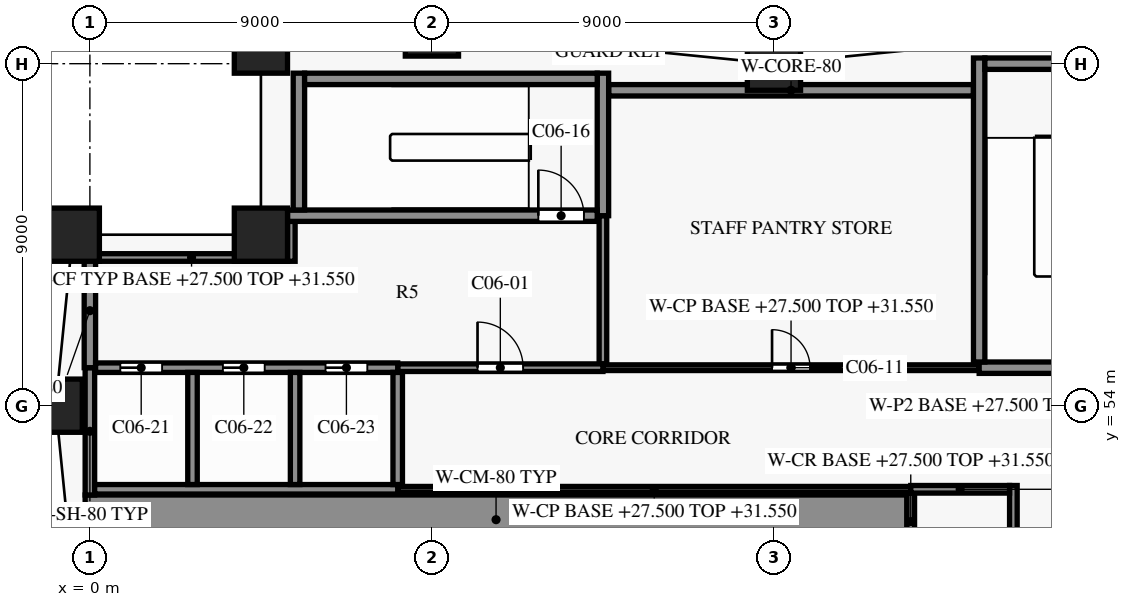
"""IFC4 building model, lengths in metres.
Left out: names, types, materials, properties, quantities, classifications, styles, units other than length and angle.
Written with IfcOpenShell. Run it as: python <this file> out.ifc"""

import sys

from ifc_helpers import new_model, si_unit, direction, frame, frame_2d, origin, origin_2d, place, context, subcontext, project, spatial, rectangle, extrude, element, fill, save


model = new_model("IFC4")
c1 = context("Model", 3, precision=1e-05, world=origin(), true_north=direction((0.0, 1.0)))
c2 = subcontext(c1, "Body", "Model", "MODEL_VIEW")
j1 = project(units=[si_unit("LENGTHUNIT", "METRE"), si_unit("PLANEANGLEUNIT", "RADIAN")], contexts=[c1])
p1 = place(None, origin())
s1 = spatial("IfcSite", under=j1, at=p1, CompositionType="ELEMENT")
p2 = place(p1, origin())
s2 = spatial("IfcBuilding", under=s1, at=p2, CompositionType="ELEMENT")
p3 = place(p2, frame((0.0, 0.0, 27.5)))
s3 = spatial("IfcBuildingStorey", under=s2, at=p3, CompositionType="ELEMENT", Elevation=27.5)
for number, where, z_axis, x_axis in (
    (1, (18.0, 63.0, 0.0), (0.0, 0.0, 1.0), (1.0, 0.0, 0.0)),
    (2, (9.0, 63.9, 0.0), (0.0, 0.0, 1.0), (1.0, 0.0, 0.0)),
    (3, (4.5, 63.45, 0.0), (0.0, 0.0, 1.0), (1.0, 0.0, 0.0)),
    (4, (-0.45, 58.5, 0.0), (0.0, 0.0, 1.0), (1.0, 0.0, 0.0)),
    (5, (-0.9, 54.0, 0.0), (0.0, 0.0, 1.0), (1.0, 0.0, 0.0)),
    (6, (4.5, 58.5, 0.0), (0.0, 0.0, 1.0), (1.0, 0.0, 0.0)),
):
    element("IfcColumn", number, at=place(p3, frame(where, z_axis=z_axis, x_axis=x_axis)), inside=s3, PredefinedType="COLUMN", context=c2, shape_type="SweptSolid", body=[
        extrude(rectangle(XDim=1.4, YDim=1.4, at=origin_2d()), origin(), (0.0, 0.0, 1.0), 4.5),
    ])
p4 = place(p3, frame((-0.125, 51.0, 0.0), z_axis=(0.0, 0.0, 1.0), x_axis=(1.0, 0.0, 0.0)))
e7 = element("IfcWall", 7, at=p4, inside=s3, PredefinedType="SHEAR", context=c2, shape_type="SweptSolid", body=[
    extrude(rectangle(XDim=21.625, YDim=1.3, at=frame_2d((10.812, 0.0))), origin(), (0.0, 0.0, 1.0), 4.2),
])
p5 = place(p3, frame((8.1, 51.8, 0.0), z_axis=(0.0, 0.0, 1.0), x_axis=(1.0, 0.0, 0.0)))
e8 = element("IfcWall", 8, at=p5, inside=s3, PredefinedType="PARTITIONING", context=c2, shape_type="SweptSolid", body=[
    extrude(rectangle(XDim=13.5, YDim=0.15, at=frame_2d((6.75, 0.0))), origin(), (0.0, 0.0, 1.0), 4.05),
])
p6 = place(p3, frame((21.6, 51.8, 0.0), z_axis=(0.0, 0.0, 1.0), x_axis=(1.0, 0.0, 0.0)))
e9 = element("IfcWall", 9, at=p6, inside=s3, PredefinedType="PARTITIONING", context=c2, shape_type="SweptSolid", body=[
    extrude(rectangle(XDim=2.6, YDim=0.2, at=frame_2d((1.3, 0.0))), origin(), (0.0, 0.0, 1.0), 4.05),
])
p7 = place(p3, frame((0.125, 51.8, 0.0), z_axis=(0.0, 0.0, 1.0), x_axis=(1.0, 0.0, 0.0)))
e10 = element("IfcWall", 10, at=p7, inside=s3, PredefinedType="SHEAR", context=c2, shape_type="SweptSolid", body=[
    extrude(rectangle(XDim=7.975, YDim=0.25, at=frame_2d((3.988, 0.0))), origin(), (0.0, 0.0, 1.0), 4.2),
])
p8 = place(p3, frame((8.1, 55.0, 0.0), z_axis=(0.0, 0.0, 1.0), x_axis=(1.0, 0.0, 0.0)))
e11 = element("IfcWall", 11, at=p8, inside=s3, PredefinedType="PARTITIONING", context=c2, shape_type="SweptSolid", body=[
    extrude(rectangle(XDim=5.4, YDim=0.2, at=frame_2d((2.7, 0.0))), origin(), (0.0, 0.0, 1.0), 4.05),
])
p9 = place(p8, frame((2.1, 0.0, 0.0)))
e12 = element("IfcOpeningElement", 12, at=p9, cuts=e11, PredefinedType="OPENING", context=c2, shape_type="SweptSolid", body=[
    extrude(rectangle(XDim=1.2, YDim=2.2, at=frame_2d((0.6, 1.1))), frame((0.0, 0.11, 0.0), z_axis=(0.0, -1.0, 0.0), x_axis=(1.0, 0.0, 0.0)), (0.0, 0.0, 1.0), 0.22),
])
p10 = place(p3, frame((13.5, 55.0, 0.0), z_axis=(0.0, 0.0, 1.0), x_axis=(1.0, 0.0, 0.0)))
e13 = element("IfcWall", 13, at=p10, inside=s3, PredefinedType="PARTITIONING", context=c2, shape_type="SweptSolid", body=[
    extrude(rectangle(XDim=9.9, YDim=0.15, at=frame_2d((4.95, 0.0))), origin(), (0.0, 0.0, 1.0), 4.05),
])
p11 = place(p10, frame((4.45, 0.0, 0.0)))
e14 = element("IfcOpeningElement", 14, at=p11, cuts=e13, PredefinedType="OPENING", context=c2, shape_type="SweptSolid", body=[
    extrude(rectangle(XDim=1.0, YDim=2.1, at=frame_2d((0.5, 1.05))), frame((0.0, 0.085, 0.0), z_axis=(0.0, -1.0, 0.0), x_axis=(1.0, 0.0, 0.0)), (0.0, 0.0, 1.0), 0.17),
])
p12 = place(p3, frame((0.15, 55.0, 0.0), z_axis=(0.0, 0.0, 1.0), x_axis=(1.0, 0.0, 0.0)))
e15 = element("IfcWall", 15, at=p12, inside=s3, PredefinedType="SHEAR", context=c2, shape_type="SweptSolid", body=[
    extrude(rectangle(XDim=7.95, YDim=0.25, at=frame_2d((3.975, 0.0))), origin(), (0.0, 0.0, 1.0), 4.2),
])
p13 = place(p12, frame((0.65, 0.0, 0.0)))
e16 = element("IfcOpeningElement", 16, at=p13, cuts=e15, PredefinedType="OPENING", context=c2, shape_type="SweptSolid", body=[
    extrude(rectangle(XDim=1.1, YDim=2.1, at=frame_2d((0.55, 1.05))), frame((0.0, 0.135, 0.0), z_axis=(0.0, -1.0, 0.0), x_axis=(1.0, 0.0, 0.0)), (0.0, 0.0, 1.0), 0.27),
])
p14 = place(p12, frame((3.35, 0.0, 0.0)))
e17 = element("IfcOpeningElement", 17, at=p14, cuts=e15, PredefinedType="OPENING", context=c2, shape_type="SweptSolid", body=[
    extrude(rectangle(XDim=1.1, YDim=2.1, at=frame_2d((0.55, 1.05))), frame((0.0, 0.135, 0.0), z_axis=(0.0, -1.0, 0.0), x_axis=(1.0, 0.0, 0.0)), (0.0, 0.0, 1.0), 0.27),
])
p15 = place(p12, frame((6.05, 0.0, 0.0)))
e18 = element("IfcOpeningElement", 18, at=p15, cuts=e15, PredefinedType="OPENING", context=c2, shape_type="SweptSolid", body=[
    extrude(rectangle(XDim=1.1, YDim=2.1, at=frame_2d((0.55, 1.05))), frame((0.0, 0.135, 0.0), z_axis=(0.0, -1.0, 0.0), x_axis=(1.0, 0.0, 0.0)), (0.0, 0.0, 1.0), 0.27),
])
p16 = place(p3, frame((23.4, 55.0, 0.0), z_axis=(0.0, 0.0, 1.0), x_axis=(1.0, 0.0, 0.0)))
e19 = element("IfcWall", 19, at=p16, inside=s3, PredefinedType="SHEAR", context=c2, shape_type="SweptSolid", body=[
    extrude(rectangle(XDim=3.45, YDim=0.3, at=frame_2d((1.725, 0.0))), origin(), (0.0, 0.0, 1.0), 4.2),
])
p17 = place(p3, frame((0.15, 57.9, 0.0), z_axis=(0.0, 0.0, 1.0), x_axis=(1.0, 0.0, 0.0)))
e20 = element("IfcWall", 20, at=p17, inside=s3, PredefinedType="PARTITIONING", context=c2, shape_type="SweptSolid", body=[
    extrude(rectangle(XDim=5.05, YDim=0.2, at=frame_2d((2.525, 0.0))), origin(), (0.0, 0.0, 1.0), 4.05),
])
p18 = place(p3, frame((5.2, 59.0, 0.0), z_axis=(0.0, 0.0, 1.0), x_axis=(1.0, 0.0, 0.0)))
e21 = element("IfcWall", 21, at=p18, inside=s3, PredefinedType="SHEAR", context=c2, shape_type="SweptSolid", body=[
    extrude(rectangle(XDim=8.15, YDim=0.3, at=frame_2d((4.075, 0.0))), origin(), (0.0, 0.0, 1.0), 4.2),
])
p19 = place(p18, frame((6.6, 0.0, 0.0)))
e22 = element("IfcOpeningElement", 22, at=p19, cuts=e21, PredefinedType="OPENING", context=c2, shape_type="SweptSolid", body=[
    extrude(rectangle(XDim=1.2, YDim=2.2, at=frame_2d((0.6, 1.1))), frame((0.0, 0.16, 0.0), z_axis=(0.0, -1.0, 0.0), x_axis=(1.0, 0.0, 0.0)), (0.0, 0.0, 1.0), 0.32),
])
p20 = place(p3, frame((13.65, 62.3, 0.0), z_axis=(0.0, 0.0, 1.0), x_axis=(1.0, 0.0, 0.0)))
e23 = element("IfcWall", 23, at=p20, inside=s3, PredefinedType="SHEAR", context=c2, shape_type="SweptSolid", body=[
    extrude(rectangle(XDim=9.6, YDim=0.3, at=frame_2d((4.8, 0.0))), origin(), (0.0, 0.0, 1.0), 4.2),
])
p21 = place(p3, frame((5.65, 62.6, 0.0), z_axis=(0.0, 0.0, 1.0), x_axis=(1.0, 0.0, 0.0)))
e24 = element("IfcWall", 24, at=p21, inside=s3, PredefinedType="SHEAR", context=c2, shape_type="SweptSolid", body=[
    extrude(rectangle(XDim=7.7, YDim=0.3, at=frame_2d((3.85, 0.0))), origin(), (0.0, 0.0, 1.0), 4.2),
])
p22 = place(p3, frame((23.55, 63.0, 0.0), z_axis=(0.0, 0.0, 1.0), x_axis=(1.0, 0.0, 0.0)))
e25 = element("IfcWall", 25, at=p22, inside=s3, PredefinedType="SHEAR", context=c2, shape_type="SweptSolid", body=[
    extrude(rectangle(XDim=3.3, YDim=0.3, at=frame_2d((1.65, 0.0))), origin(), (0.0, 0.0, 1.0), 4.2),
])
p23 = place(p3, frame((0.0, 55.0, 0.0), z_axis=(0.0, 0.0, 1.0), x_axis=(0.0, 1.0, 0.0)))
e26 = element("IfcWall", 26, at=p23, inside=s3, PredefinedType="SHEAR", context=c2, shape_type="SweptSolid", body=[
    extrude(rectangle(XDim=3.0, YDim=0.3, at=frame_2d((1.5, 0.0))), origin(), (0.0, 0.0, 1.0), 4.2),
])
p24 = place(p3, frame((0.0, 51.65, 0.0), z_axis=(0.0, 0.0, 1.0), x_axis=(0.0, 1.0, 0.0)))
e27 = element("IfcWall", 27, at=p24, inside=s3, PredefinedType="SHEAR", context=c2, shape_type="SweptSolid", body=[
    extrude(rectangle(XDim=3.35, YDim=0.25, at=frame_2d((1.675, 0.0))), origin(), (0.0, 0.0, 1.0), 4.2),
])
p25 = place(p3, frame((2.7, 51.925, 0.0), z_axis=(0.0, 0.0, 1.0), x_axis=(0.0, 1.0, 0.0)))
e28 = element("IfcWall", 28, at=p25, inside=s3, PredefinedType="SHEAR", context=c2, shape_type="SweptSolid", body=[
    extrude(rectangle(XDim=2.95, YDim=0.25, at=frame_2d((1.475, 0.0))), origin(), (0.0, 0.0, 1.0), 4.2),
])
p26 = place(p3, frame((5.3, 57.8, 0.0), z_axis=(0.0, 0.0, 1.0), x_axis=(0.0, 1.0, 0.0)))
e29 = element("IfcWall", 29, at=p26, inside=s3, PredefinedType="PARTITIONING", context=c2, shape_type="SweptSolid", body=[
    extrude(rectangle(XDim=1.05, YDim=0.2, at=frame_2d((0.525, 0.0))), origin(), (0.0, 0.0, 1.0), 4.05),
])
p27 = place(p3, frame((5.4, 51.925, 0.0), z_axis=(0.0, 0.0, 1.0), x_axis=(0.0, 1.0, 0.0)))
e30 = element("IfcWall", 30, at=p27, inside=s3, PredefinedType="SHEAR", context=c2, shape_type="SweptSolid", body=[
    extrude(rectangle(XDim=2.95, YDim=0.25, at=frame_2d((1.475, 0.0))), origin(), (0.0, 0.0, 1.0), 4.2),
])
p28 = place(p3, frame((5.5, 59.15, 0.0), z_axis=(0.0, 0.0, 1.0), x_axis=(0.0, 1.0, 0.0)))
e31 = element("IfcWall", 31, at=p28, inside=s3, PredefinedType="SHEAR", context=c2, shape_type="SweptSolid", body=[
    extrude(rectangle(XDim=3.6, YDim=0.3, at=frame_2d((1.8, 0.0))), origin(), (0.0, 0.0, 1.0), 4.2),
])
p29 = place(p3, frame((8.1, 51.925, 0.0), z_axis=(0.0, 0.0, 1.0), x_axis=(0.0, 1.0, 0.0)))
e32 = element("IfcWall", 32, at=p29, inside=s3, PredefinedType="SHEAR", context=c2, shape_type="SweptSolid", body=[
    extrude(rectangle(XDim=2.95, YDim=0.25, at=frame_2d((1.475, 0.0))), origin(), (0.0, 0.0, 1.0), 4.2),
])
p30 = place(p3, frame((13.5, 55.1, 0.0), z_axis=(0.0, 0.0, 1.0), x_axis=(0.0, 1.0, 0.0)))
e33 = element("IfcWall", 33, at=p30, inside=s3, PredefinedType="PARTITIONING", context=c2, shape_type="SweptSolid", body=[
    extrude(rectangle(XDim=3.9, YDim=0.2, at=frame_2d((1.95, 0.0))), origin(), (0.0, 0.0, 1.0), 4.05),
])
p31 = place(p3, frame((13.5, 59.0, 0.0), z_axis=(0.0, 0.0, 1.0), x_axis=(0.0, 1.0, 0.0)))
e34 = element("IfcWall", 34, at=p31, inside=s3, PredefinedType="SHEAR", context=c2, shape_type="SweptSolid", body=[
    extrude(rectangle(XDim=3.75, YDim=0.3, at=frame_2d((1.875, 0.0))), origin(), (0.0, 0.0, 1.0), 4.2),
])
p32 = place(p3, frame((21.6, 50.2, 0.0), z_axis=(0.0, 0.0, 1.0), x_axis=(0.0, 1.0, 0.0)))
e35 = element("IfcWall", 35, at=p32, inside=s3, PredefinedType="PARTITIONING", context=c2, shape_type="SweptSolid", body=[
    extrude(rectangle(XDim=1.5, YDim=0.2, at=frame_2d((0.75, 0.0))), origin(), (0.0, 0.0, 1.0), 4.05),
])
p33 = place(p3, frame((23.4, 55.15, 0.0), z_axis=(0.0, 0.0, 1.0), x_axis=(0.0, 1.0, 0.0)))
e36 = element("IfcWall", 36, at=p33, inside=s3, PredefinedType="SHEAR", context=c2, shape_type="SweptSolid", body=[
    extrude(rectangle(XDim=8.0, YDim=0.3, at=frame_2d((4.0, 0.0))), origin(), (0.0, 0.0, 1.0), 4.2),
])
p34 = place(p3, frame((24.3, 46.9, 0.0), z_axis=(0.0, 0.0, 1.0), x_axis=(0.0, 1.0, 0.0)))
e37 = element("IfcWall", 37, at=p34, inside=s3, PredefinedType="SHEAR", context=c2, shape_type="SweptSolid", body=[
    extrude(rectangle(XDim=5.0, YDim=0.2, at=frame_2d((2.5, 0.0))), origin(), (0.0, 0.0, 1.0), 4.2),
])
p35 = place(p9, origin())
e38 = element("IfcDoor", 38, at=p35, inside=s3, OperationType="SINGLE_SWING_RIGHT", PredefinedType="DOOR", context=c2, shape_type="SweptSolid", body=[
    extrude(rectangle(XDim=1.2, YDim=2.2, at=frame_2d((0.6, 1.1))), frame((0.0, 0.025, 0.0), z_axis=(0.0, -1.0, 0.0), x_axis=(1.0, 0.0, 0.0)), (0.0, 0.0, 1.0), 0.05),
])
fill(e12, e38)
p36 = place(p11, origin())
e39 = element("IfcDoor", 39, at=p36, inside=s3, OperationType="SINGLE_SWING_LEFT", PredefinedType="DOOR", context=c2, shape_type="SweptSolid", body=[
    extrude(rectangle(XDim=1.0, YDim=2.1, at=frame_2d((0.5, 1.05))), frame((0.0, 0.025, 0.0), z_axis=(0.0, -1.0, 0.0), x_axis=(1.0, 0.0, 0.0)), (0.0, 0.0, 1.0), 0.05),
])
fill(e14, e39)
p37 = place(p19, origin())
e40 = element("IfcDoor", 40, at=p37, inside=s3, OperationType="SINGLE_SWING_RIGHT", PredefinedType="DOOR", context=c2, shape_type="SweptSolid", body=[
    extrude(rectangle(XDim=1.2, YDim=2.2, at=frame_2d((0.6, 1.1))), frame((0.0, 0.025, 0.0), z_axis=(0.0, -1.0, 0.0), x_axis=(1.0, 0.0, 0.0)), (0.0, 0.0, 1.0), 0.05),
])
fill(e22, e40)
p38 = place(p13, origin())
e41 = element("IfcDoor", 41, at=p38, inside=s3, OperationType="DOUBLE_DOOR_SLIDING", PredefinedType="DOOR", context=c2, shape_type="SweptSolid", body=[
    extrude(rectangle(XDim=1.1, YDim=2.1, at=frame_2d((0.55, 1.05))), frame((0.0, 0.025, 0.0), z_axis=(0.0, -1.0, 0.0), x_axis=(1.0, 0.0, 0.0)), (0.0, 0.0, 1.0), 0.05),
])
fill(e16, e41)
p39 = place(p14, origin())
e42 = element("IfcDoor", 42, at=p39, inside=s3, OperationType="DOUBLE_DOOR_SLIDING", PredefinedType="DOOR", context=c2, shape_type="SweptSolid", body=[
    extrude(rectangle(XDim=1.1, YDim=2.1, at=frame_2d((0.55, 1.05))), frame((0.0, 0.025, 0.0), z_axis=(0.0, -1.0, 0.0), x_axis=(1.0, 0.0, 0.0)), (0.0, 0.0, 1.0), 0.05),
])
fill(e17, e42)
p40 = place(p15, origin())
e43 = element("IfcDoor", 43, at=p40, inside=s3, OperationType="DOUBLE_DOOR_SLIDING", PredefinedType="DOOR", context=c2, shape_type="SweptSolid", body=[
    extrude(rectangle(XDim=1.1, YDim=2.1, at=frame_2d((0.55, 1.05))), frame((0.0, 0.025, 0.0), z_axis=(0.0, -1.0, 0.0), x_axis=(1.0, 0.0, 0.0)), (0.0, 0.0, 1.0), 0.05),
])
fill(e18, e43)
save(model, sys.argv[1])
